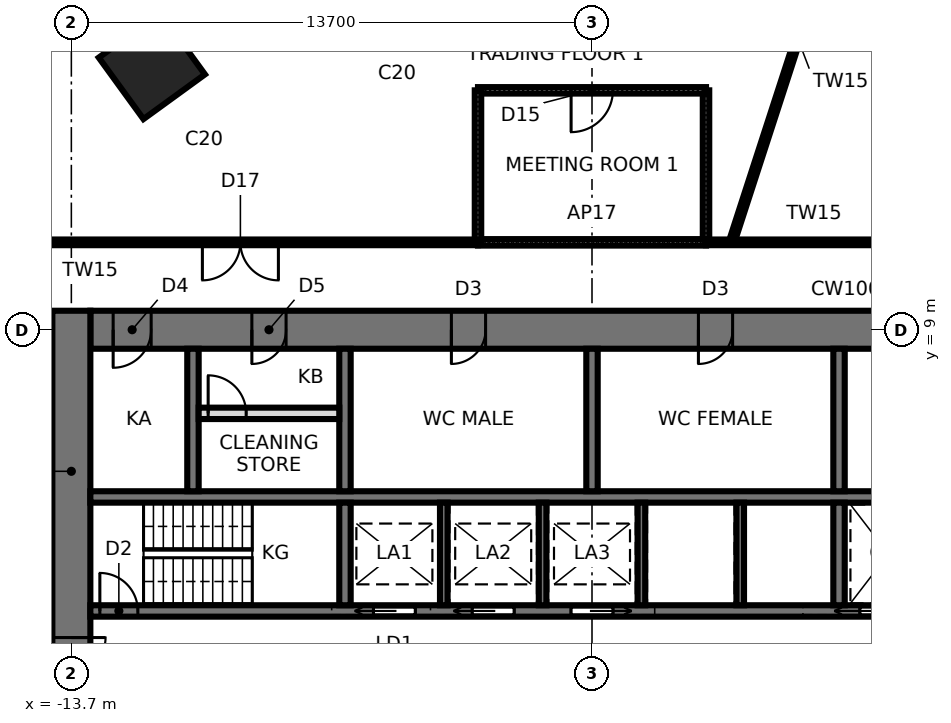
"""IFC4 building model, lengths in metres.
Left out: names, types, materials, properties, quantities, classifications, styles, units other than length and angle.
Written with IfcOpenShell. Run it as: python <this file> out.ifc"""

import sys

from ifc_helpers import new_model, si_unit, direction, frame, frame_2d, origin, origin_2d, place, context, subcontext, project, spatial, rectangle, extrude, element, fill, save


model = new_model("IFC4")
c1 = context("Model", 3, precision=1e-05, world=origin(), true_north=direction((0.0, 1.0)))
c2 = subcontext(c1, "Body", "Model", "MODEL_VIEW")
j1 = project(units=[si_unit("LENGTHUNIT", "METRE"), si_unit("PLANEANGLEUNIT", "RADIAN")], contexts=[c1])
p1 = place(None, origin())
s1 = spatial("IfcSite", under=j1, at=p1, CompositionType="ELEMENT")
p2 = place(p1, origin())
s2 = spatial("IfcBuilding", under=s1, at=p2, CompositionType="ELEMENT")
p3 = place(p2, frame((0.0, 0.0, 65.8)))
s3 = spatial("IfcBuildingStorey", under=s2, at=p3, CompositionType="ELEMENT", Elevation=65.8)
p4 = place(p3, frame((-11.581, 15.94, 0.0), z_axis=(0.0, 0.0, 1.0), x_axis=(-0.587785252292, 0.809016994375, 0.0)))
e1 = element("IfcColumn", 1, at=p4, inside=s3, PredefinedType="COLUMN", context=c2, shape_type="SweptSolid", body=[
    extrude(rectangle(XDim=2.0, YDim=2.0, at=origin_2d()), origin(), (0.0, 0.0, 1.0), 4.2),
])
p5 = place(p3, frame((13.2, 9.0, 0.0), z_axis=(0.0, 0.0, 1.0), x_axis=(-1.0, 0.0, 0.0)))
e2 = element("IfcWall", 2, at=p5, inside=s3, PredefinedType="SHEAR", context=c2, shape_type="SweptSolid", body=[
    extrude(rectangle(XDim=26.4, YDim=1.0, at=frame_2d((13.2, 0.0))), origin(), (0.0, 0.0, 1.0), 4.2),
])
p6 = place(p5, frame((2.65, 0.0, 0.0)))
e3 = element("IfcOpeningElement", 3, at=p6, cuts=e2, PredefinedType="OPENING", context=c2, shape_type="SweptSolid", body=[
    extrude(rectangle(XDim=0.9, YDim=2.1, at=frame_2d((0.45, 1.05))), frame((0.0, 0.51, 0.0), z_axis=(0.0, -1.0, 0.0), x_axis=(1.0, 0.0, 0.0)), (0.0, 0.0, 1.0), 1.02),
])
p7 = place(p5, frame((9.5, 0.0, 0.0)))
e4 = element("IfcOpeningElement", 4, at=p7, cuts=e2, PredefinedType="OPENING", context=c2, shape_type="SweptSolid", body=[
    extrude(rectangle(XDim=0.9, YDim=2.1, at=frame_2d((0.45, 1.05))), frame((0.0, 0.51, 0.0), z_axis=(0.0, -1.0, 0.0), x_axis=(1.0, 0.0, 0.0)), (0.0, 0.0, 1.0), 1.02),
])
p8 = place(p5, frame((16.0, 0.0, 0.0)))
e5 = element("IfcOpeningElement", 5, at=p8, cuts=e2, PredefinedType="OPENING", context=c2, shape_type="SweptSolid", body=[
    extrude(rectangle(XDim=0.9, YDim=2.1, at=frame_2d((0.45, 1.05))), frame((0.0, 0.51, 0.0), z_axis=(0.0, -1.0, 0.0), x_axis=(1.0, 0.0, 0.0)), (0.0, 0.0, 1.0), 1.02),
])
p9 = place(p5, frame((21.25, 0.0, 0.0)))
e6 = element("IfcOpeningElement", 6, at=p9, cuts=e2, PredefinedType="OPENING", context=c2, shape_type="SweptSolid", body=[
    extrude(rectangle(XDim=0.9, YDim=2.1, at=frame_2d((0.45, 1.05))), frame((0.0, 0.51, 0.0), z_axis=(0.0, -1.0, 0.0), x_axis=(1.0, 0.0, 0.0)), (0.0, 0.0, 1.0), 1.02),
])
p10 = place(p5, frame((24.8, 0.0, 0.0)))
e7 = element("IfcOpeningElement", 7, at=p10, cuts=e2, PredefinedType="OPENING", context=c2, shape_type="SweptSolid", body=[
    extrude(rectangle(XDim=1.0, YDim=2.1, at=frame_2d((0.5, 1.05))), frame((0.0, 0.51, 0.0), z_axis=(0.0, -1.0, 0.0), x_axis=(1.0, 0.0, 0.0)), (0.0, 0.0, 1.0), 1.02),
])
p11 = place(p3, frame((-13.7, 9.5, 0.0), z_axis=(0.0, 0.0, 1.0), x_axis=(0.0, -1.0, 0.0)))
e8 = element("IfcWall", 8, at=p11, inside=s3, PredefinedType="SHEAR", context=c2, shape_type="SweptSolid", body=[
    extrude(rectangle(XDim=19.0, YDim=1.0, at=frame_2d((9.5, 0.0))), origin(), (0.0, 0.0, 1.0), 4.2),
])
p12 = place(p11, frame((8.6, 0.0, 0.0)))
e9 = element("IfcOpeningElement", 9, at=p12, cuts=e8, PredefinedType="OPENING", context=c2, shape_type="SweptSolid", body=[
    extrude(rectangle(XDim=1.8, YDim=2.4, at=frame_2d((0.9, 1.2))), frame((0.0, 0.51, 0.0), z_axis=(0.0, -1.0, 0.0), x_axis=(1.0, 0.0, 0.0)), (0.0, 0.0, 1.0), 1.02),
])
p13 = place(p3, frame((-13.2, 1.6, 0.0), z_axis=(0.0, 0.0, 1.0), x_axis=(1.0, 0.0, 0.0)))
e10 = element("IfcWall", 10, at=p13, inside=s3, PredefinedType="SHEAR", context=c2, shape_type="SweptSolid", body=[
    extrude(rectangle(XDim=26.4, YDim=0.3, at=frame_2d((13.2, 0.0))), origin(), (0.0, 0.0, 1.0), 4.2),
])
p14 = place(p13, frame((0.25, 0.0, 0.0)))
e11 = element("IfcOpeningElement", 11, at=p14, cuts=e10, PredefinedType="OPENING", context=c2, shape_type="SweptSolid", body=[
    extrude(rectangle(XDim=1.0, YDim=2.1, at=frame_2d((0.5, 1.05))), frame((0.0, 0.16, 0.0), z_axis=(0.0, -1.0, 0.0), x_axis=(1.0, 0.0, 0.0)), (0.0, 0.0, 1.0), 0.32),
])
p15 = place(p13, frame((20.25, 0.0, 0.0)))
e12 = element("IfcOpeningElement", 12, at=p15, cuts=e10, PredefinedType="OPENING", context=c2, shape_type="SweptSolid", body=[
    extrude(rectangle(XDim=1.5, YDim=2.4, at=frame_2d((0.75, 1.2))), frame((0.0, 0.16, 0.0), z_axis=(0.0, -1.0, 0.0), x_axis=(1.0, 0.0, 0.0)), (0.0, 0.0, 1.0), 0.32),
])
p16 = place(p13, frame((7.45, 0.0, 0.0)))
e13 = element("IfcOpeningElement", 13, at=p16, cuts=e10, PredefinedType="OPENING", context=c2, shape_type="SweptSolid", body=[
    extrude(rectangle(XDim=1.1, YDim=2.3, at=frame_2d((0.55, 1.15))), frame((0.0, 0.16, 0.0), z_axis=(0.0, -1.0, 0.0), x_axis=(1.0, 0.0, 0.0)), (0.0, 0.0, 1.0), 0.32),
])
p17 = place(p13, frame((10.05, 0.0, 0.0)))
e14 = element("IfcOpeningElement", 14, at=p17, cuts=e10, PredefinedType="OPENING", context=c2, shape_type="SweptSolid", body=[
    extrude(rectangle(XDim=1.1, YDim=2.3, at=frame_2d((0.55, 1.15))), frame((0.0, 0.16, 0.0), z_axis=(0.0, -1.0, 0.0), x_axis=(1.0, 0.0, 0.0)), (0.0, 0.0, 1.0), 0.32),
])
p18 = place(p13, frame((12.65, 0.0, 0.0)))
e15 = element("IfcOpeningElement", 15, at=p18, cuts=e10, PredefinedType="OPENING", context=c2, shape_type="SweptSolid", body=[
    extrude(rectangle(XDim=1.1, YDim=2.3, at=frame_2d((0.55, 1.15))), frame((0.0, 0.16, 0.0), z_axis=(0.0, -1.0, 0.0), x_axis=(1.0, 0.0, 0.0)), (0.0, 0.0, 1.0), 0.32),
])
p19 = place(p13, frame((24.15, 0.0, 0.0)))
e16 = element("IfcOpeningElement", 16, at=p19, cuts=e10, PredefinedType="OPENING", context=c2, shape_type="SweptSolid", body=[
    extrude(rectangle(XDim=0.9, YDim=2.1, at=frame_2d((0.45, 1.05))), frame((0.0, 0.16, 0.0), z_axis=(0.0, -1.0, 0.0), x_axis=(1.0, 0.0, 0.0)), (0.0, 0.0, 1.0), 0.32),
])
p20 = place(p3, frame((-13.2, 4.6, 0.0), z_axis=(0.0, 0.0, 1.0), x_axis=(1.0, 0.0, 0.0)))
e17 = element("IfcWall", 17, at=p20, inside=s3, PredefinedType="SHEAR", context=c2, shape_type="SweptSolid", body=[
    extrude(rectangle(XDim=26.4, YDim=0.3, at=frame_2d((13.2, 0.0))), origin(), (0.0, 0.0, 1.0), 4.2),
])
p21 = place(p3, frame((-6.5, 1.75, 0.0), z_axis=(0.0, 0.0, 1.0), x_axis=(0.0, 1.0, 0.0)))
e18 = element("IfcWall", 18, at=p21, inside=s3, PredefinedType="SHEAR", context=c2, shape_type="SweptSolid", body=[
    extrude(rectangle(XDim=2.7, YDim=0.3, at=frame_2d((1.35, 0.0))), origin(), (0.0, 0.0, 1.0), 4.2),
])
p22 = place(p3, frame((-6.5, 4.75, 0.0), z_axis=(0.0, 0.0, 1.0), x_axis=(0.0, 1.0, 0.0)))
e19 = element("IfcWall", 19, at=p22, inside=s3, PredefinedType="SHEAR", context=c2, shape_type="SweptSolid", body=[
    extrude(rectangle(XDim=3.75, YDim=0.3, at=frame_2d((1.875, 0.0))), origin(), (0.0, 0.0, 1.0), 4.2),
])
p23 = place(p3, frame((6.5, 1.75, 0.0), z_axis=(0.0, 0.0, 1.0), x_axis=(0.0, 1.0, 0.0)))
e20 = element("IfcWall", 20, at=p23, inside=s3, PredefinedType="SHEAR", context=c2, shape_type="SweptSolid", body=[
    extrude(rectangle(XDim=2.7, YDim=0.3, at=frame_2d((1.35, 0.0))), origin(), (0.0, 0.0, 1.0), 4.2),
])
p24 = place(p3, frame((6.5, 4.75, 0.0), z_axis=(0.0, 0.0, 1.0), x_axis=(0.0, 1.0, 0.0)))
e21 = element("IfcWall", 21, at=p24, inside=s3, PredefinedType="SHEAR", context=c2, shape_type="SweptSolid", body=[
    extrude(rectangle(XDim=3.75, YDim=0.3, at=frame_2d((1.875, 0.0))), origin(), (0.0, 0.0, 1.0), 4.2),
])
for number, where, z_axis, x_axis in (
    (22, (-3.9, 1.75, 0.0), (0.0, 0.0, 1.0), (0.0, 1.0, 0.0)),
    (23, (-1.3, 1.75, 0.0), (0.0, 0.0, 1.0), (0.0, 1.0, 0.0)),
    (24, (1.3, 1.75, 0.0), (0.0, 0.0, 1.0), (0.0, 1.0, 0.0)),
    (25, (3.9, 1.75, 0.0), (0.0, 0.0, 1.0), (0.0, 1.0, 0.0)),
):
    element("IfcWall", number, at=place(p3, frame(where, z_axis=z_axis, x_axis=x_axis)), inside=s3, PredefinedType="SHEAR", context=c2, shape_type="SweptSolid", body=[
        extrude(rectangle(XDim=2.7, YDim=0.2, at=frame_2d((1.35, 0.0))), origin(), (0.0, 0.0, 1.0), 4.2),
    ])
for number, where, z_axis, x_axis in (
    (26, (0.0, 4.75, 0.0), (0.0, 0.0, 1.0), (0.0, 1.0, 0.0)),
    (27, (-10.5, 4.75, 0.0), (0.0, 0.0, 1.0), (0.0, 1.0, 0.0)),
):
    element("IfcWall", number, at=place(p3, frame(where, z_axis=z_axis, x_axis=x_axis)), inside=s3, PredefinedType="SHEAR", context=c2, shape_type="SweptSolid", body=[
        extrude(rectangle(XDim=3.75, YDim=0.3, at=frame_2d((1.875, 0.0))), origin(), (0.0, 0.0, 1.0), 4.2),
    ])
p25 = place(p3, frame((-10.35, 6.8, 0.0), z_axis=(0.0, 0.0, 1.0), x_axis=(1.0, 0.0, 0.0)))
e28 = element("IfcWall", 28, at=p25, inside=s3, PredefinedType="PARTITIONING", context=c2, shape_type="SweptSolid", body=[
    extrude(rectangle(XDim=3.7, YDim=0.3, at=frame_2d((1.85, 0.0))), origin(), (0.0, 0.0, 1.0), 4.04),
])
p26 = place(p25, frame((0.25, 0.0, 0.0)))
e29 = element("IfcOpeningElement", 29, at=p26, cuts=e28, PredefinedType="OPENING", context=c2, shape_type="SweptSolid", body=[
    extrude(rectangle(XDim=1.0, YDim=2.4, at=frame_2d((0.5, 1.2))), frame((0.0, 0.16, 0.0), z_axis=(0.0, -1.0, 0.0), x_axis=(1.0, 0.0, 0.0)), (0.0, 0.0, 1.0), 0.32),
])
p27 = place(p3, frame((16.0, 11.3, 0.0), z_axis=(0.0, 0.0, 1.0), x_axis=(-1.0, 0.0, 0.0)))
e30 = element("IfcWall", 30, at=p27, inside=s3, PredefinedType="PARTITIONING", context=c2, shape_type="SweptSolid", body=[
    extrude(rectangle(XDim=13.0, YDim=0.15, at=frame_2d((6.5, 0.0))), origin(), (0.0, 0.0, 1.0), 4.04),
])
p28 = place(p27, frame((5.164, 0.0, 0.0)))
e31 = element("IfcOpeningElement", 31, at=p28, cuts=e30, PredefinedType="OPENING", context=c2, shape_type="SweptSolid", body=[
    extrude(rectangle(XDim=2.0, YDim=2.4, at=frame_2d((1.0, 1.2))), frame((0.0, 0.085, 0.0), z_axis=(0.0, -1.0, 0.0), x_axis=(1.0, 0.0, 0.0)), (0.0, 0.0, 1.0), 0.17),
])
p29 = place(p3, frame((7.157, 22.026, 0.0), z_axis=(0.0, 0.0, 1.0), x_axis=(-0.309010203018, -0.951058722914, 0.0)))
e32 = element("IfcWall", 32, at=p29, inside=s3, PredefinedType="PARTITIONING", context=c2, shape_type="SweptSolid", body=[
    extrude(rectangle(XDim=11.278, YDim=0.15, at=frame_2d((5.639, 0.0))), origin(), (0.0, 0.0, 1.0), 2.84),
])
p30 = place(p3, frame((3.0, 11.3, 0.0), z_axis=(0.0, 0.0, 1.0), x_axis=(0.0, 1.0, 0.0)))
e33 = element("IfcWall", 33, at=p30, inside=s3, PredefinedType="PARTITIONING", context=c2, shape_type="SweptSolid", body=[
    extrude(rectangle(XDim=4.0, YDim=0.17, at=frame_2d((2.0, 0.0))), origin(), (0.0, 0.0, 1.0), 4.04),
])
p31 = place(p3, frame((-3.0, 11.3, 0.0), z_axis=(0.0, 0.0, 1.0), x_axis=(1.0, 0.0, 0.0)))
e34 = element("IfcWall", 34, at=p31, inside=s3, PredefinedType="PARTITIONING", context=c2, shape_type="SweptSolid", body=[
    extrude(rectangle(XDim=6.0, YDim=0.17, at=frame_2d((3.0, 0.0))), origin(), (0.0, 0.0, 1.0), 4.04),
])
p32 = place(p3, frame((3.0, 15.3, 0.0), z_axis=(0.0, 0.0, 1.0), x_axis=(-1.0, 0.0, 0.0)))
e35 = element("IfcWall", 35, at=p32, inside=s3, PredefinedType="PARTITIONING", context=c2, shape_type="SweptSolid", body=[
    extrude(rectangle(XDim=6.0, YDim=0.17, at=frame_2d((3.0, 0.0))), origin(), (0.0, 0.0, 1.0), 3.586),
])
p33 = place(p32, frame((2.45, 0.0, 0.0)))
e36 = element("IfcOpeningElement", 36, at=p33, cuts=e35, PredefinedType="OPENING", context=c2, shape_type="SweptSolid", body=[
    extrude(rectangle(XDim=1.1, YDim=2.4, at=frame_2d((0.55, 1.2))), frame((0.0, 0.095, 0.0), z_axis=(0.0, -1.0, 0.0), x_axis=(1.0, 0.0, 0.0)), (0.0, 0.0, 1.0), 0.19),
])
p34 = place(p3, frame((-3.0, 15.3, 0.0), z_axis=(0.0, 0.0, 1.0), x_axis=(0.0, -1.0, 0.0)))
e37 = element("IfcWall", 37, at=p34, inside=s3, PredefinedType="PARTITIONING", context=c2, shape_type="SweptSolid", body=[
    extrude(rectangle(XDim=4.0, YDim=0.17, at=frame_2d((2.0, 0.0))), origin(), (0.0, 0.0, 1.0), 4.04),
])
p35 = place(p3, frame((-3.0, 11.3, 0.0), z_axis=(0.0, 0.0, 1.0), x_axis=(-1.0, 0.0, 0.0)))
e38 = element("IfcWall", 38, at=p35, inside=s3, PredefinedType="PARTITIONING", context=c2, shape_type="SweptSolid", body=[
    extrude(rectangle(XDim=13.0, YDim=0.15, at=frame_2d((6.5, 0.0))), origin(), (0.0, 0.0, 1.0), 4.04),
])
p36 = place(p35, frame((5.252, 0.0, 0.0)))
e39 = element("IfcOpeningElement", 39, at=p36, cuts=e38, PredefinedType="OPENING", context=c2, shape_type="SweptSolid", body=[
    extrude(rectangle(XDim=2.0, YDim=2.4, at=frame_2d((1.0, 1.2))), frame((0.0, 0.085, 0.0), z_axis=(0.0, -1.0, 0.0), x_axis=(1.0, 0.0, 0.0)), (0.0, 0.0, 1.0), 0.17),
])
p37 = place(p12, origin())
e40 = element("IfcDoor", 40, at=p37, inside=s3, OperationType="DOUBLE_DOOR_SINGLE_SWING", PredefinedType="DOOR", context=c2, shape_type="SweptSolid", body=[
    extrude(rectangle(XDim=1.72, YDim=2.36, at=frame_2d((0.9, 1.18))), frame((0.0, 0.025, 0.0), z_axis=(0.0, -1.0, 0.0), x_axis=(1.0, 0.0, 0.0)), (0.0, 0.0, 1.0), 0.05),
    extrude(rectangle(XDim=0.04, YDim=2.4, at=frame_2d((0.02, 1.2))), frame((0.0, 0.25, 0.0), z_axis=(0.0, -1.0, 0.0), x_axis=(1.0, 0.0, 0.0)), (0.0, 0.0, 1.0), 0.5),
    extrude(rectangle(XDim=0.04, YDim=2.4, at=frame_2d((1.78, 1.2))), frame((0.0, 0.25, 0.0), z_axis=(0.0, -1.0, 0.0), x_axis=(1.0, 0.0, 0.0)), (0.0, 0.0, 1.0), 0.5),
    extrude(rectangle(XDim=1.72, YDim=0.04, at=frame_2d((0.9, 2.38))), frame((0.0, 0.25, 0.0), z_axis=(0.0, -1.0, 0.0), x_axis=(1.0, 0.0, 0.0)), (0.0, 0.0, 1.0), 0.5),
])
fill(e9, e40)
p38 = place(p14, origin())
e41 = element("IfcDoor", 41, at=p38, inside=s3, OperationType="SINGLE_SWING_LEFT", PredefinedType="DOOR", context=c2, shape_type="SweptSolid", body=[
    extrude(rectangle(XDim=1.0, YDim=2.1, at=frame_2d((0.5, 1.05))), frame((0.0, 0.025, 0.0), z_axis=(0.0, -1.0, 0.0), x_axis=(1.0, 0.0, 0.0)), (0.0, 0.0, 1.0), 0.05),
])
fill(e11, e41)
p39 = place(p15, origin())
e42 = element("IfcDoor", 42, at=p39, inside=s3, OperationType="SLIDING_TO_LEFT", PredefinedType="DOOR", context=c2, shape_type="SweptSolid", body=[
    extrude(rectangle(XDim=1.5, YDim=2.4, at=frame_2d((0.75, 1.2))), frame((0.0, 0.025, 0.0), z_axis=(0.0, -1.0, 0.0), x_axis=(1.0, 0.0, 0.0)), (0.0, 0.0, 1.0), 0.05),
])
fill(e12, e42)
p40 = place(p16, origin())
e43 = element("IfcDoor", 43, at=p40, inside=s3, OperationType="SLIDING_TO_LEFT", PredefinedType="DOOR", context=c2, shape_type="SweptSolid", body=[
    extrude(rectangle(XDim=1.1, YDim=2.3, at=frame_2d((0.55, 1.15))), frame((0.0, 0.025, 0.0), z_axis=(0.0, -1.0, 0.0), x_axis=(1.0, 0.0, 0.0)), (0.0, 0.0, 1.0), 0.05),
])
fill(e13, e43)
p41 = place(p17, origin())
e44 = element("IfcDoor", 44, at=p41, inside=s3, OperationType="SLIDING_TO_LEFT", PredefinedType="DOOR", context=c2, shape_type="SweptSolid", body=[
    extrude(rectangle(XDim=1.1, YDim=2.3, at=frame_2d((0.55, 1.15))), frame((0.0, 0.025, 0.0), z_axis=(0.0, -1.0, 0.0), x_axis=(1.0, 0.0, 0.0)), (0.0, 0.0, 1.0), 0.05),
])
fill(e14, e44)
p42 = place(p18, origin())
e45 = element("IfcDoor", 45, at=p42, inside=s3, OperationType="SLIDING_TO_RIGHT", PredefinedType="DOOR", context=c2, shape_type="SweptSolid", body=[
    extrude(rectangle(XDim=1.1, YDim=2.3, at=frame_2d((0.55, 1.15))), frame((0.0, 0.025, 0.0), z_axis=(0.0, -1.0, 0.0), x_axis=(1.0, 0.0, 0.0)), (0.0, 0.0, 1.0), 0.05),
])
fill(e15, e45)
p43 = place(p7, origin())
e46 = element("IfcDoor", 46, at=p43, inside=s3, OperationType="SINGLE_SWING_RIGHT", PredefinedType="DOOR", context=c2, shape_type="SweptSolid", body=[
    extrude(rectangle(XDim=0.82, YDim=2.06, at=frame_2d((0.45, 1.03))), frame((0.0, 0.025, 0.0), z_axis=(0.0, -1.0, 0.0), x_axis=(1.0, 0.0, 0.0)), (0.0, 0.0, 1.0), 0.05),
    extrude(rectangle(XDim=0.04, YDim=2.1, at=frame_2d((0.02, 1.05))), frame((0.0, 0.25, 0.0), z_axis=(0.0, -1.0, 0.0), x_axis=(1.0, 0.0, 0.0)), (0.0, 0.0, 1.0), 0.5),
    extrude(rectangle(XDim=0.04, YDim=2.1, at=frame_2d((0.88, 1.05))), frame((0.0, 0.25, 0.0), z_axis=(0.0, -1.0, 0.0), x_axis=(1.0, 0.0, 0.0)), (0.0, 0.0, 1.0), 0.5),
    extrude(rectangle(XDim=0.82, YDim=0.04, at=frame_2d((0.45, 2.08))), frame((0.0, 0.25, 0.0), z_axis=(0.0, -1.0, 0.0), x_axis=(1.0, 0.0, 0.0)), (0.0, 0.0, 1.0), 0.5),
])
fill(e4, e46)
p44 = place(p8, origin())
e47 = element("IfcDoor", 47, at=p44, inside=s3, OperationType="SINGLE_SWING_RIGHT", PredefinedType="DOOR", context=c2, shape_type="SweptSolid", body=[
    extrude(rectangle(XDim=0.82, YDim=2.06, at=frame_2d((0.45, 1.03))), frame((0.0, 0.025, 0.0), z_axis=(0.0, -1.0, 0.0), x_axis=(1.0, 0.0, 0.0)), (0.0, 0.0, 1.0), 0.05),
    extrude(rectangle(XDim=0.04, YDim=2.1, at=frame_2d((0.02, 1.05))), frame((0.0, 0.25, 0.0), z_axis=(0.0, -1.0, 0.0), x_axis=(1.0, 0.0, 0.0)), (0.0, 0.0, 1.0), 0.5),
    extrude(rectangle(XDim=0.04, YDim=2.1, at=frame_2d((0.88, 1.05))), frame((0.0, 0.25, 0.0), z_axis=(0.0, -1.0, 0.0), x_axis=(1.0, 0.0, 0.0)), (0.0, 0.0, 1.0), 0.5),
    extrude(rectangle(XDim=0.82, YDim=0.04, at=frame_2d((0.45, 2.08))), frame((0.0, 0.25, 0.0), z_axis=(0.0, -1.0, 0.0), x_axis=(1.0, 0.0, 0.0)), (0.0, 0.0, 1.0), 0.5),
])
fill(e5, e47)
p45 = place(p9, origin())
e48 = element("IfcDoor", 48, at=p45, inside=s3, OperationType="SINGLE_SWING_RIGHT", PredefinedType="DOOR", context=c2, shape_type="SweptSolid", body=[
    extrude(rectangle(XDim=0.82, YDim=2.06, at=frame_2d((0.45, 1.03))), frame((0.0, 0.025, 0.0), z_axis=(0.0, -1.0, 0.0), x_axis=(1.0, 0.0, 0.0)), (0.0, 0.0, 1.0), 0.05),
    extrude(rectangle(XDim=0.04, YDim=2.1, at=frame_2d((0.02, 1.05))), frame((0.0, 0.25, 0.0), z_axis=(0.0, -1.0, 0.0), x_axis=(1.0, 0.0, 0.0)), (0.0, 0.0, 1.0), 0.5),
    extrude(rectangle(XDim=0.04, YDim=2.1, at=frame_2d((0.88, 1.05))), frame((0.0, 0.25, 0.0), z_axis=(0.0, -1.0, 0.0), x_axis=(1.0, 0.0, 0.0)), (0.0, 0.0, 1.0), 0.5),
    extrude(rectangle(XDim=0.82, YDim=0.04, at=frame_2d((0.45, 2.08))), frame((0.0, 0.25, 0.0), z_axis=(0.0, -1.0, 0.0), x_axis=(1.0, 0.0, 0.0)), (0.0, 0.0, 1.0), 0.5),
])
fill(e6, e48)
p46 = place(p10, origin())
e49 = element("IfcDoor", 49, at=p46, inside=s3, OperationType="SINGLE_SWING_RIGHT", PredefinedType="DOOR", context=c2, shape_type="SweptSolid", body=[
    extrude(rectangle(XDim=0.92, YDim=2.06, at=frame_2d((0.5, 1.03))), frame((0.0, 0.025, 0.0), z_axis=(0.0, -1.0, 0.0), x_axis=(1.0, 0.0, 0.0)), (0.0, 0.0, 1.0), 0.05),
    extrude(rectangle(XDim=0.04, YDim=2.1, at=frame_2d((0.02, 1.05))), frame((0.0, 0.25, 0.0), z_axis=(0.0, -1.0, 0.0), x_axis=(1.0, 0.0, 0.0)), (0.0, 0.0, 1.0), 0.5),
    extrude(rectangle(XDim=0.04, YDim=2.1, at=frame_2d((0.98, 1.05))), frame((0.0, 0.25, 0.0), z_axis=(0.0, -1.0, 0.0), x_axis=(1.0, 0.0, 0.0)), (0.0, 0.0, 1.0), 0.5),
    extrude(rectangle(XDim=0.92, YDim=0.04, at=frame_2d((0.5, 2.08))), frame((0.0, 0.25, 0.0), z_axis=(0.0, -1.0, 0.0), x_axis=(1.0, 0.0, 0.0)), (0.0, 0.0, 1.0), 0.5),
])
fill(e7, e49)
p47 = place(p26, origin())
e50 = element("IfcDoor", 50, at=p47, inside=s3, OperationType="SINGLE_SWING_LEFT", PredefinedType="DOOR", context=c2, shape_type="SweptSolid", body=[
    extrude(rectangle(XDim=1.0, YDim=2.4, at=frame_2d((0.5, 1.2))), frame((0.0, 0.025, 0.0), z_axis=(0.0, -1.0, 0.0), x_axis=(1.0, 0.0, 0.0)), (0.0, 0.0, 1.0), 0.05),
])
fill(e29, e50)
p48 = place(p33, origin())
e51 = element("IfcDoor", 51, at=p48, inside=s3, OperationType="SINGLE_SWING_RIGHT", PredefinedType="DOOR", context=c2, shape_type="SweptSolid", body=[
    extrude(rectangle(XDim=1.1, YDim=2.4, at=frame_2d((0.55, 1.2))), frame((0.0, 0.025, 0.0), z_axis=(0.0, -1.0, 0.0), x_axis=(1.0, 0.0, 0.0)), (0.0, 0.0, 1.0), 0.05),
])
fill(e36, e51)
p49 = place(p36, origin())
e52 = element("IfcDoor", 52, at=p49, inside=s3, OperationType="DOUBLE_DOOR_SINGLE_SWING", PredefinedType="DOOR", context=c2, shape_type="SweptSolid", body=[
    extrude(rectangle(XDim=2.0, YDim=2.4, at=frame_2d((1.0, 1.2))), frame((0.0, 0.025, 0.0), z_axis=(0.0, -1.0, 0.0), x_axis=(1.0, 0.0, 0.0)), (0.0, 0.0, 1.0), 0.05),
])
fill(e39, e52)
save(model, sys.argv[1])
